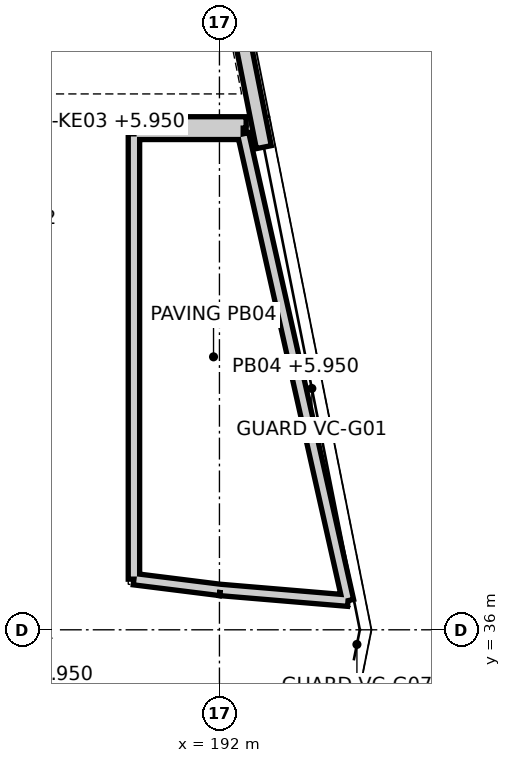
"""IFC4 building model, lengths in metres.
Left out: names, types, materials, properties, quantities, classifications, styles, units other than length and angle.
Written with IfcOpenShell. Run it as: python <this file> out.ifc"""

import sys

from ifc_helpers import new_model, si_unit, direction, frame, frame_2d, origin, place, context, subcontext, project, spatial, polyline, rectangle, outline, extrude, element, save


model = new_model("IFC4")
c1 = context("Model", 3, precision=1e-05, world=origin(), true_north=direction((0.0, 1.0)))
c2 = subcontext(c1, "Body", "Model", "MODEL_VIEW")
j1 = project(units=[si_unit("LENGTHUNIT", "METRE"), si_unit("PLANEANGLEUNIT", "RADIAN")], contexts=[c1])
p1 = place(None, origin())
s1 = spatial("IfcSite", under=j1, at=p1, CompositionType="ELEMENT")
p2 = place(p1, origin())
s2 = spatial("IfcBuilding", under=s1, at=p2, CompositionType="ELEMENT")
p3 = place(p2, frame((0.0, 0.0, 6.0)))
s3 = spatial("IfcBuildingStorey", under=s2, at=p3, CompositionType="ELEMENT", Elevation=6.0)
p4 = place(p3, frame((192.008, 36.525, -0.05), z_axis=(0.0, 0.0, 1.0), x_axis=(0.996495764633, -0.08364323684, 0.0)))
e1 = element("IfcWall", 1, at=p4, inside=s3, PredefinedType="PARAPET", context=c2, shape_type="SweptSolid", body=[
    extrude(outline(polyline([(-0.001, -0.075), (1.792, -0.075), (1.588, 0.075), (0.001, 0.075), (-0.001, -0.075)])), origin(), (0.0, 0.0, 1.0), 0.5),
])
p5 = place(p3, frame((193.692, 36.383, -0.05), z_axis=(0.0, 0.0, 1.0), x_axis=(-0.219176242021, 0.975685284779, 0.0)))
e2 = element("IfcWall", 2, at=p5, inside=s3, PredefinedType="PARAPET", context=c2, shape_type="SweptSolid", body=[
    extrude(outline(polyline([(-0.102, -0.075), (6.355, -0.075), (6.235, 0.075), (0.102, 0.075), (-0.102, -0.075)])), origin(), (0.0, 0.0, 1.0), 0.5),
])
p6 = place(p3, frame((192.312, 42.525, -0.05), z_axis=(0.0, 0.0, 1.0), x_axis=(-1.0, 0.0, 0.0)))
e3 = element("IfcWall", 3, at=p6, inside=s3, PredefinedType="PARAPET", context=c2, shape_type="SweptSolid", body=[
    extrude(outline(polyline([(-0.06, -0.075), (1.512, -0.075), (1.362, 0.075), (0.06, 0.075), (-0.06, -0.075)])), origin(), (0.0, 0.0, 1.0), 0.5),
])
p7 = place(p3, frame((190.875, 42.525, -0.05), z_axis=(0.0, 0.0, 1.0), x_axis=(0.0, -1.0, 0.0)))
e4 = element("IfcWall", 4, at=p7, inside=s3, PredefinedType="PARAPET", context=c2, shape_type="SweptSolid", body=[
    extrude(outline(polyline([(-0.075, -0.075), (5.925, -0.075), (5.792, 0.075), (0.075, 0.075), (-0.075, -0.075)])), origin(), (0.0, 0.0, 1.0), 0.5),
])
p8 = place(p3, frame((190.875, 36.666, -0.05), z_axis=(0.0, 0.0, 1.0), x_axis=(0.992277876714, -0.124034734589, 0.0)))
e5 = element("IfcWall", 5, at=p8, inside=s3, PredefinedType="PARAPET", context=c2, shape_type="SweptSolid", body=[
    extrude(outline(polyline([(-0.066, -0.075), (1.143, -0.075), (1.14, 0.075), (0.066, 0.075), (-0.066, -0.075)])), origin(), (0.0, 0.0, 1.0), 0.5),
])
p9 = place(p3, frame((189.23, 42.675, -0.05), z_axis=(0.0, 0.0, 1.0), x_axis=(1.0, 0.0, 0.0)))
e6 = element("IfcWall", 6, at=p9, inside=s3, PredefinedType="PARAPET", context=c2, shape_type="SweptSolid", body=[
    extrude(rectangle(XDim=3.121, YDim=0.15, at=frame_2d((1.561, 0.0))), origin(), (0.0, 0.0, 1.0), 0.5),
])
p10 = place(p3, frame((192.584, 42.35, -0.05), z_axis=(0.0, 0.0, 1.0), x_axis=(-0.195075759432, 0.980788176969, 0.0)))
e7 = element("IfcWall", 7, at=p10, inside=s3, PredefinedType="PARAPET", context=c2, shape_type="SweptSolid", body=[
    extrude(outline(polyline([(0.0, -0.1), (3.63, -0.1), (3.591, 0.1), (0.0, 0.1), (0.0, -0.1)])), origin(), (0.0, 0.0, 1.0), 1.1),
])
save(model, sys.argv[1])
